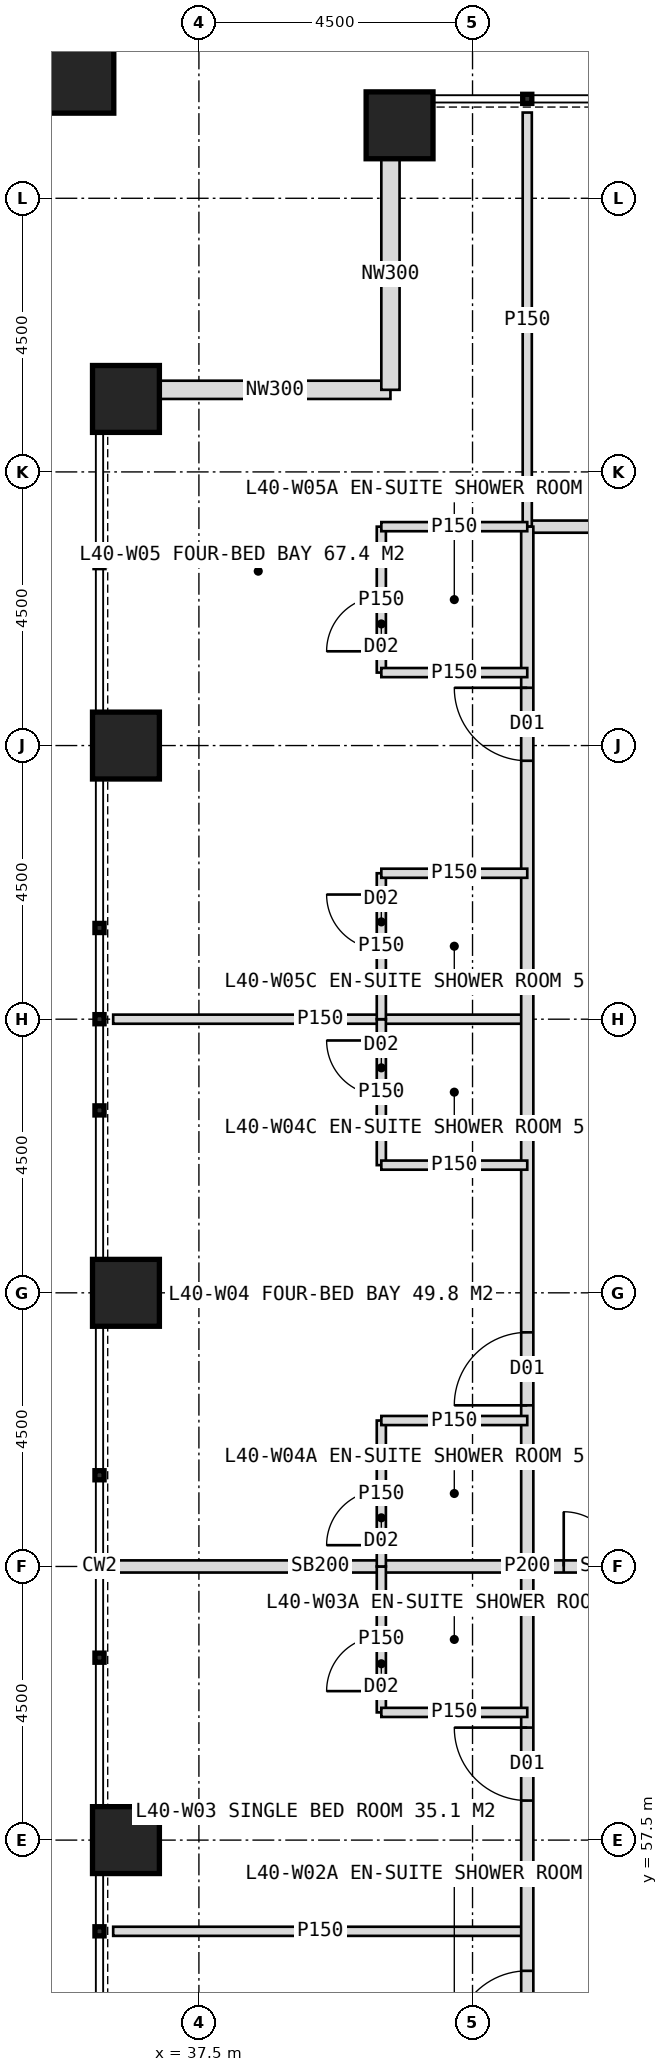
"""IFC4 building model, lengths in metres.
Left out: names, types, materials, properties, quantities, classifications, styles, units other than length and angle.
Written with IfcOpenShell. Run it as: python <this file> out.ifc"""

import sys

from ifc_helpers import new_model, si_unit, direction, frame, frame_2d, origin, origin_2d, place, context, subcontext, project, spatial, rectangle, hollow_rectangle, extrude, element, fill, save


model = new_model("IFC4")
c1 = context("Model", 3, precision=1e-05, world=origin(), true_north=direction((0.0, 1.0)))
c2 = subcontext(c1, "Body", "Model", "MODEL_VIEW")
j1 = project(units=[si_unit("LENGTHUNIT", "METRE"), si_unit("PLANEANGLEUNIT", "RADIAN")], contexts=[c1])
p1 = place(None, origin())
s1 = spatial("IfcSite", under=j1, at=p1, CompositionType="ELEMENT")
p2 = place(p1, origin())
s2 = spatial("IfcBuilding", under=s1, at=p2, CompositionType="ELEMENT")
p3 = place(p2, frame((0.0, 0.0, 168.0)))
s3 = spatial("IfcBuildingStorey", under=s2, at=p3, CompositionType="ELEMENT", Elevation=168.0)
for number, where, z_axis, x_axis in (
    (1, (40.8, 85.7, 0.0), (0.0, 0.0, 1.0), (1.0, 0.0, 0.0)),
    (2, (36.3, 57.5, 0.0), (0.0, 0.0, 1.0), (1.0, 0.0, 0.0)),
    (3, (36.3, 66.5, 0.0), (0.0, 0.0, 1.0), (1.0, 0.0, 0.0)),
    (4, (36.3, 75.5, 0.0), (0.0, 0.0, 1.0), (1.0, 0.0, 0.0)),
    (5, (36.3, 81.2, 0.0), (0.0, 0.0, 1.0), (1.0, 0.0, 0.0)),
):
    element("IfcColumn", number, at=place(p3, frame(where, z_axis=z_axis, x_axis=x_axis)), inside=s3, PredefinedType="COLUMN", context=c2, shape_type="SweptSolid", body=[
        extrude(hollow_rectangle(XDim=1.1, YDim=1.1, WallThickness=0.1, at=origin_2d()), origin(), (0.0, 0.0, 1.0), 4.0),
    ])
p4 = place(p3, frame((35.4, 86.6, 0.0), z_axis=(0.0, 0.0, 1.0), x_axis=(1.0, 0.0, 0.0)))
e6 = element("IfcColumn", 6, at=p4, inside=s3, PredefinedType="COLUMN", context=c2, shape_type="SweptSolid", body=[
    extrude(hollow_rectangle(XDim=1.4, YDim=1.4, WallThickness=0.08, at=origin_2d()), origin(), (0.0, 0.0, 1.0), 2.0),
])
for number, where, z_axis, x_axis in (
    (7, (36.85, 81.35, 0.0), (0.0, 0.0, 1.0), (1.0, 0.0, 0.0)),
    (8, (40.65, 81.35, 0.0), (0.0, 0.0, 1.0), (0.0, 1.0, 0.0)),
):
    element("IfcWall", number, at=place(p3, frame(where, z_axis=z_axis, x_axis=x_axis)), inside=s3, PredefinedType="ELEMENTEDWALL", context=c2, shape_type="SweptSolid", body=[
        extrude(rectangle(XDim=3.8, YDim=0.3, at=frame_2d((1.9, 0.0))), origin(), (0.0, 0.0, 1.0), 4.0),
    ])
p5 = place(p3, frame((42.9, 79.1, 0.0), z_axis=(0.0, 0.0, 1.0), x_axis=(1.0, 0.0, 0.0)))
e9 = element("IfcWall", 9, at=p5, inside=s3, PredefinedType="PARTITIONING", context=c2, shape_type="SweptSolid", body=[
    extrude(rectangle(XDim=34.2, YDim=0.2, at=frame_2d((17.1, 0.0))), origin(), (0.0, 0.0, 1.0), 3.75),
])
p6 = place(p5, frame((3.55, 0.0, 0.0)))
e10 = element("IfcOpeningElement", 10, at=p6, cuts=e9, PredefinedType="OPENING", context=c2, shape_type="SweptSolid", body=[
    extrude(rectangle(XDim=1.0, YDim=2.1, at=frame_2d((0.5, 1.05))), frame((0.0, 0.11, 0.0), z_axis=(0.0, -1.0, 0.0), x_axis=(1.0, 0.0, 0.0)), (0.0, 0.0, 1.0), 0.22),
])
p7 = place(p5, frame((10.75, 0.0, 0.0)))
e11 = element("IfcOpeningElement", 11, at=p7, cuts=e9, PredefinedType="OPENING", context=c2, shape_type="SweptSolid", body=[
    extrude(rectangle(XDim=1.2, YDim=2.2, at=frame_2d((0.6, 1.1))), frame((0.0, 0.11, 0.0), z_axis=(0.0, -1.0, 0.0), x_axis=(1.0, 0.0, 0.0)), (0.0, 0.0, 1.0), 0.22),
])
p8 = place(p5, frame((20.75, 0.0, 0.0)))
e12 = element("IfcOpeningElement", 12, at=p8, cuts=e9, PredefinedType="OPENING", context=c2, shape_type="SweptSolid", body=[
    extrude(rectangle(XDim=1.2, YDim=2.2, at=frame_2d((0.6, 1.1))), frame((0.0, 0.11, 0.0), z_axis=(0.0, -1.0, 0.0), x_axis=(1.0, 0.0, 0.0)), (0.0, 0.0, 1.0), 0.22),
])
p9 = place(p5, frame((27.25, 0.0, 0.0)))
e13 = element("IfcOpeningElement", 13, at=p9, cuts=e9, PredefinedType="OPENING", context=c2, shape_type="SweptSolid", body=[
    extrude(rectangle(XDim=1.2, YDim=2.2, at=frame_2d((0.6, 1.1))), frame((0.0, 0.11, 0.0), z_axis=(0.0, -1.0, 0.0), x_axis=(1.0, 0.0, 0.0)), (0.0, 0.0, 1.0), 0.22),
])
for number, where, z_axis, x_axis in (
    (14, (42.9, 79.1, 0.0), (0.0, 0.0, 1.0), (0.0, 1.0, 0.0)),
    (15, (42.9, 56.0, 0.0), (0.0, 0.0, 1.0), (-1.0, 0.0, 0.0)),
):
    element("IfcWall", number, at=place(p3, frame(where, z_axis=z_axis, x_axis=x_axis)), inside=s3, PredefinedType="PARTITIONING", context=c2, shape_type="SweptSolid", body=[
        extrude(rectangle(XDim=6.81, YDim=0.15, at=frame_2d((3.405, 0.0))), origin(), (0.0, 0.0, 1.0), 3.75),
    ])
p10 = place(p3, frame((42.9, 62.0, 0.0), z_axis=(0.0, 0.0, 1.0), x_axis=(-1.0, 0.0, 0.0)))
e16 = element("IfcWall", 16, at=p10, inside=s3, PredefinedType="SOLIDWALL", context=c2, shape_type="SweptSolid", body=[
    extrude(rectangle(XDim=6.81, YDim=0.2, at=frame_2d((3.405, 0.0))), origin(), (0.0, 0.0, 1.0), 2.95),
])
p11 = place(p3, frame((42.9, 71.0, 0.0), z_axis=(0.0, 0.0, 1.0), x_axis=(-1.0, 0.0, 0.0)))
e17 = element("IfcWall", 17, at=p11, inside=s3, PredefinedType="PARTITIONING", context=c2, shape_type="SweptSolid", body=[
    extrude(rectangle(XDim=6.81, YDim=0.15, at=frame_2d((3.405, 0.0))), origin(), (0.0, 0.0, 1.0), 3.75),
])
p12 = place(p3, frame((42.9, 44.9, 0.0), z_axis=(0.0, 0.0, 1.0), x_axis=(0.0, 1.0, 0.0)))
e18 = element("IfcWall", 18, at=p12, inside=s3, PredefinedType="PARTITIONING", context=c2, shape_type="SweptSolid", body=[
    extrude(rectangle(XDim=34.2, YDim=0.2, at=frame_2d((17.1, 0.0))), origin(), (0.0, 0.0, 1.0), 3.75),
])
p13 = place(p12, frame((2.15, 0.0, 0.0)))
e19 = element("IfcOpeningElement", 19, at=p13, cuts=e18, PredefinedType="OPENING", context=c2, shape_type="SweptSolid", body=[
    extrude(rectangle(XDim=1.2, YDim=2.2, at=frame_2d((0.6, 1.1))), frame((0.0, 0.11, 0.0), z_axis=(0.0, -1.0, 0.0), x_axis=(1.0, 0.0, 0.0)), (0.0, 0.0, 1.0), 0.22),
])
p14 = place(p12, frame((9.25, 0.0, 0.0)))
e20 = element("IfcOpeningElement", 20, at=p14, cuts=e18, PredefinedType="OPENING", context=c2, shape_type="SweptSolid", body=[
    extrude(rectangle(XDim=1.2, YDim=2.2, at=frame_2d((0.6, 1.1))), frame((0.0, 0.11, 0.0), z_axis=(0.0, -1.0, 0.0), x_axis=(1.0, 0.0, 0.0)), (0.0, 0.0, 1.0), 0.22),
])
p15 = place(p12, frame((13.25, 0.0, 0.0)))
e21 = element("IfcOpeningElement", 21, at=p15, cuts=e18, PredefinedType="OPENING", context=c2, shape_type="SweptSolid", body=[
    extrude(rectangle(XDim=1.2, YDim=2.2, at=frame_2d((0.6, 1.1))), frame((0.0, 0.11, 0.0), z_axis=(0.0, -1.0, 0.0), x_axis=(1.0, 0.0, 0.0)), (0.0, 0.0, 1.0), 0.22),
])
p16 = place(p12, frame((19.75, 0.0, 0.0)))
e22 = element("IfcOpeningElement", 22, at=p16, cuts=e18, PredefinedType="OPENING", context=c2, shape_type="SweptSolid", body=[
    extrude(rectangle(XDim=1.2, YDim=2.2, at=frame_2d((0.6, 1.1))), frame((0.0, 0.11, 0.0), z_axis=(0.0, -1.0, 0.0), x_axis=(1.0, 0.0, 0.0)), (0.0, 0.0, 1.0), 0.22),
])
p17 = place(p12, frame((30.35, 0.0, 0.0)))
e23 = element("IfcOpeningElement", 23, at=p17, cuts=e18, PredefinedType="OPENING", context=c2, shape_type="SweptSolid", body=[
    extrude(rectangle(XDim=1.2, YDim=2.2, at=frame_2d((0.6, 1.1))), frame((0.0, 0.11, 0.0), z_axis=(0.0, -1.0, 0.0), x_axis=(1.0, 0.0, 0.0)), (0.0, 0.0, 1.0), 0.22),
])
p18 = place(p3, frame((40.5, 59.6, 0.0), z_axis=(0.0, 0.0, 1.0), x_axis=(0.0, 1.0, 0.0)))
e24 = element("IfcWall", 24, at=p18, inside=s3, PredefinedType="PARTITIONING", context=c2, shape_type="SweptSolid", body=[
    extrude(rectangle(XDim=2.4, YDim=0.15, at=frame_2d((1.2, 0.0))), origin(), (0.0, 0.0, 1.0), 3.75),
])
p19 = place(p18, frame((0.35, 0.0, 0.0)))
e25 = element("IfcOpeningElement", 25, at=p19, cuts=e24, PredefinedType="OPENING", context=c2, shape_type="SweptSolid", body=[
    extrude(rectangle(XDim=0.9, YDim=2.1, at=frame_2d((0.45, 1.05))), frame((0.0, 0.085, 0.0), z_axis=(0.0, -1.0, 0.0), x_axis=(1.0, 0.0, 0.0)), (0.0, 0.0, 1.0), 0.17),
])
p20 = place(p3, frame((42.9, 59.6, 0.0), z_axis=(0.0, 0.0, 1.0), x_axis=(-1.0, 0.0, 0.0)))
e26 = element("IfcWall", 26, at=p20, inside=s3, PredefinedType="PARTITIONING", context=c2, shape_type="SweptSolid", body=[
    extrude(rectangle(XDim=2.4, YDim=0.15, at=frame_2d((1.2, 0.0))), origin(), (0.0, 0.0, 1.0), 3.75),
])
p21 = place(p3, frame((40.5, 62.0, 0.0), z_axis=(0.0, 0.0, 1.0), x_axis=(0.0, 1.0, 0.0)))
e27 = element("IfcWall", 27, at=p21, inside=s3, PredefinedType="PARTITIONING", context=c2, shape_type="SweptSolid", body=[
    extrude(rectangle(XDim=2.4, YDim=0.15, at=frame_2d((1.2, 0.0))), origin(), (0.0, 0.0, 1.0), 3.75),
])
p22 = place(p21, frame((0.35, 0.0, 0.0)))
e28 = element("IfcOpeningElement", 28, at=p22, cuts=e27, PredefinedType="OPENING", context=c2, shape_type="SweptSolid", body=[
    extrude(rectangle(XDim=0.9, YDim=2.1, at=frame_2d((0.45, 1.05))), frame((0.0, 0.085, 0.0), z_axis=(0.0, -1.0, 0.0), x_axis=(1.0, 0.0, 0.0)), (0.0, 0.0, 1.0), 0.17),
])
p23 = place(p3, frame((42.9, 64.4, 0.0), z_axis=(0.0, 0.0, 1.0), x_axis=(-1.0, 0.0, 0.0)))
e29 = element("IfcWall", 29, at=p23, inside=s3, PredefinedType="PARTITIONING", context=c2, shape_type="SweptSolid", body=[
    extrude(rectangle(XDim=2.4, YDim=0.15, at=frame_2d((1.2, 0.0))), origin(), (0.0, 0.0, 1.0), 3.75),
])
p24 = place(p3, frame((40.5, 68.6, 0.0), z_axis=(0.0, 0.0, 1.0), x_axis=(0.0, 1.0, 0.0)))
e30 = element("IfcWall", 30, at=p24, inside=s3, PredefinedType="PARTITIONING", context=c2, shape_type="SweptSolid", body=[
    extrude(rectangle(XDim=2.4, YDim=0.15, at=frame_2d((1.2, 0.0))), origin(), (0.0, 0.0, 1.0), 3.75),
])
p25 = place(p24, frame((1.15, 0.0, 0.0)))
e31 = element("IfcOpeningElement", 31, at=p25, cuts=e30, PredefinedType="OPENING", context=c2, shape_type="SweptSolid", body=[
    extrude(rectangle(XDim=0.9, YDim=2.1, at=frame_2d((0.45, 1.05))), frame((0.0, 0.085, 0.0), z_axis=(0.0, -1.0, 0.0), x_axis=(1.0, 0.0, 0.0)), (0.0, 0.0, 1.0), 0.17),
])
p26 = place(p3, frame((42.9, 68.6, 0.0), z_axis=(0.0, 0.0, 1.0), x_axis=(-1.0, 0.0, 0.0)))
e32 = element("IfcWall", 32, at=p26, inside=s3, PredefinedType="PARTITIONING", context=c2, shape_type="SweptSolid", body=[
    extrude(rectangle(XDim=2.4, YDim=0.15, at=frame_2d((1.2, 0.0))), origin(), (0.0, 0.0, 1.0), 3.75),
])
p27 = place(p3, frame((40.5, 76.7, 0.0), z_axis=(0.0, 0.0, 1.0), x_axis=(0.0, 1.0, 0.0)))
e33 = element("IfcWall", 33, at=p27, inside=s3, PredefinedType="PARTITIONING", context=c2, shape_type="SweptSolid", body=[
    extrude(rectangle(XDim=2.4, YDim=0.15, at=frame_2d((1.2, 0.0))), origin(), (0.0, 0.0, 1.0), 3.75),
])
p28 = place(p27, frame((0.35, 0.0, 0.0)))
e34 = element("IfcOpeningElement", 34, at=p28, cuts=e33, PredefinedType="OPENING", context=c2, shape_type="SweptSolid", body=[
    extrude(rectangle(XDim=0.9, YDim=2.1, at=frame_2d((0.45, 1.05))), frame((0.0, 0.085, 0.0), z_axis=(0.0, -1.0, 0.0), x_axis=(1.0, 0.0, 0.0)), (0.0, 0.0, 1.0), 0.17),
])
p29 = place(p3, frame((42.9, 76.7, 0.0), z_axis=(0.0, 0.0, 1.0), x_axis=(-1.0, 0.0, 0.0)))
e35 = element("IfcWall", 35, at=p29, inside=s3, PredefinedType="PARTITIONING", context=c2, shape_type="SweptSolid", body=[
    extrude(rectangle(XDim=2.4, YDim=0.15, at=frame_2d((1.2, 0.0))), origin(), (0.0, 0.0, 1.0), 3.75),
])
p30 = place(p3, frame((40.5, 71.0, 0.0), z_axis=(0.0, 0.0, 1.0), x_axis=(0.0, 1.0, 0.0)))
e36 = element("IfcWall", 36, at=p30, inside=s3, PredefinedType="PARTITIONING", context=c2, shape_type="SweptSolid", body=[
    extrude(rectangle(XDim=2.4, YDim=0.15, at=frame_2d((1.2, 0.0))), origin(), (0.0, 0.0, 1.0), 3.75),
])
p31 = place(p30, frame((1.15, 0.0, 0.0)))
e37 = element("IfcOpeningElement", 37, at=p31, cuts=e36, PredefinedType="OPENING", context=c2, shape_type="SweptSolid", body=[
    extrude(rectangle(XDim=0.9, YDim=2.1, at=frame_2d((0.45, 1.05))), frame((0.0, 0.085, 0.0), z_axis=(0.0, -1.0, 0.0), x_axis=(1.0, 0.0, 0.0)), (0.0, 0.0, 1.0), 0.17),
])
for number, where, z_axis, x_axis in (
    (38, (42.9, 73.4, 0.0), (0.0, 0.0, 1.0), (-1.0, 0.0, 0.0)),
    (39, (42.9, 79.1, 0.0), (0.0, 0.0, 1.0), (-1.0, 0.0, 0.0)),
):
    element("IfcWall", number, at=place(p3, frame(where, z_axis=z_axis, x_axis=x_axis)), inside=s3, PredefinedType="PARTITIONING", context=c2, shape_type="SweptSolid", body=[
        extrude(rectangle(XDim=2.4, YDim=0.15, at=frame_2d((1.2, 0.0))), origin(), (0.0, 0.0, 1.0), 3.75),
    ])
p32 = place(p3, frame((45.6, 62.0, 0.0), z_axis=(0.0, 0.0, 1.0), x_axis=(-1.0, 0.0, 0.0)))
e40 = element("IfcWall", 40, at=p32, inside=s3, PredefinedType="SOLIDWALL", context=c2, shape_type="SweptSolid", body=[
    extrude(rectangle(XDim=2.7, YDim=0.2, at=frame_2d((1.35, 0.0))), origin(), (0.0, 0.0, 1.0), 2.95),
])
p33 = place(p32, frame((0.3, 0.0, 0.0)))
e41 = element("IfcOpeningElement", 41, at=p33, cuts=e40, PredefinedType="OPENING", context=c2, shape_type="SweptSolid", body=[
    extrude(rectangle(XDim=1.8, YDim=2.2, at=frame_2d((0.9, 1.1))), frame((0.0, 0.11, 0.0), z_axis=(0.0, -1.0, 0.0), x_axis=(1.0, 0.0, 0.0)), (0.0, 0.0, 1.0), 0.22),
])
p34 = place(p14, origin())
e42 = element("IfcDoor", 42, at=p34, inside=s3, OperationType="SINGLE_SWING_LEFT", PredefinedType="DOOR", context=c2, shape_type="SweptSolid", body=[
    extrude(rectangle(XDim=1.2, YDim=2.2, at=frame_2d((0.6, 1.1))), frame((0.0, 0.025, 0.0), z_axis=(0.0, -1.0, 0.0), x_axis=(1.0, 0.0, 0.0)), (0.0, 0.0, 1.0), 0.05),
])
fill(e20, e42)
p35 = place(p15, origin())
e43 = element("IfcDoor", 43, at=p35, inside=s3, OperationType="SINGLE_SWING_RIGHT", PredefinedType="DOOR", context=c2, shape_type="SweptSolid", body=[
    extrude(rectangle(XDim=1.2, YDim=2.2, at=frame_2d((0.6, 1.1))), frame((0.0, 0.025, 0.0), z_axis=(0.0, -1.0, 0.0), x_axis=(1.0, 0.0, 0.0)), (0.0, 0.0, 1.0), 0.05),
])
fill(e21, e43)
p36 = place(p19, origin())
e44 = element("IfcDoor", 44, at=p36, inside=s3, OperationType="SINGLE_SWING_LEFT", PredefinedType="DOOR", context=c2, shape_type="SweptSolid", body=[
    extrude(rectangle(XDim=0.9, YDim=2.1, at=frame_2d((0.45, 1.05))), frame((0.0, 0.025, 0.0), z_axis=(0.0, -1.0, 0.0), x_axis=(1.0, 0.0, 0.0)), (0.0, 0.0, 1.0), 0.05),
])
fill(e25, e44)
p37 = place(p16, origin())
e45 = element("IfcDoor", 45, at=p37, inside=s3, OperationType="SINGLE_SWING_LEFT", PredefinedType="DOOR", context=c2, shape_type="SweptSolid", body=[
    extrude(rectangle(XDim=1.2, YDim=2.2, at=frame_2d((0.6, 1.1))), frame((0.0, 0.025, 0.0), z_axis=(0.0, -1.0, 0.0), x_axis=(1.0, 0.0, 0.0)), (0.0, 0.0, 1.0), 0.05),
])
fill(e22, e45)
p38 = place(p22, origin())
e46 = element("IfcDoor", 46, at=p38, inside=s3, OperationType="SINGLE_SWING_LEFT", PredefinedType="DOOR", context=c2, shape_type="SweptSolid", body=[
    extrude(rectangle(XDim=0.9, YDim=2.1, at=frame_2d((0.45, 1.05))), frame((0.0, 0.025, 0.0), z_axis=(0.0, -1.0, 0.0), x_axis=(1.0, 0.0, 0.0)), (0.0, 0.0, 1.0), 0.05),
])
fill(e28, e46)
p39 = place(p25, origin())
e47 = element("IfcDoor", 47, at=p39, inside=s3, OperationType="SINGLE_SWING_RIGHT", PredefinedType="DOOR", context=c2, shape_type="SweptSolid", body=[
    extrude(rectangle(XDim=0.9, YDim=2.1, at=frame_2d((0.45, 1.05))), frame((0.0, 0.025, 0.0), z_axis=(0.0, -1.0, 0.0), x_axis=(1.0, 0.0, 0.0)), (0.0, 0.0, 1.0), 0.05),
])
fill(e31, e47)
p40 = place(p17, origin())
e48 = element("IfcDoor", 48, at=p40, inside=s3, OperationType="SINGLE_SWING_RIGHT", PredefinedType="DOOR", context=c2, shape_type="SweptSolid", body=[
    extrude(rectangle(XDim=1.2, YDim=2.2, at=frame_2d((0.6, 1.1))), frame((0.0, 0.025, 0.0), z_axis=(0.0, -1.0, 0.0), x_axis=(1.0, 0.0, 0.0)), (0.0, 0.0, 1.0), 0.05),
])
fill(e23, e48)
p41 = place(p28, origin())
e49 = element("IfcDoor", 49, at=p41, inside=s3, OperationType="SINGLE_SWING_LEFT", PredefinedType="DOOR", context=c2, shape_type="SweptSolid", body=[
    extrude(rectangle(XDim=0.9, YDim=2.1, at=frame_2d((0.45, 1.05))), frame((0.0, 0.025, 0.0), z_axis=(0.0, -1.0, 0.0), x_axis=(1.0, 0.0, 0.0)), (0.0, 0.0, 1.0), 0.05),
])
fill(e34, e49)
p42 = place(p31, origin())
e50 = element("IfcDoor", 50, at=p42, inside=s3, OperationType="SINGLE_SWING_RIGHT", PredefinedType="DOOR", context=c2, shape_type="SweptSolid", body=[
    extrude(rectangle(XDim=0.9, YDim=2.1, at=frame_2d((0.45, 1.05))), frame((0.0, 0.025, 0.0), z_axis=(0.0, -1.0, 0.0), x_axis=(1.0, 0.0, 0.0)), (0.0, 0.0, 1.0), 0.05),
])
fill(e37, e50)
p43 = place(p33, origin())
e51 = element("IfcDoor", 51, at=p43, inside=s3, OperationType="DOUBLE_DOOR_DOUBLE_SWING", PredefinedType="DOOR", context=c2, shape_type="SweptSolid", body=[
    extrude(rectangle(XDim=1.8, YDim=2.2, at=frame_2d((0.9, 1.1))), frame((0.0, 0.025, 0.0), z_axis=(0.0, -1.0, 0.0), x_axis=(1.0, 0.0, 0.0)), (0.0, 0.0, 1.0), 0.05),
])
fill(e41, e51)
save(model, sys.argv[1])
